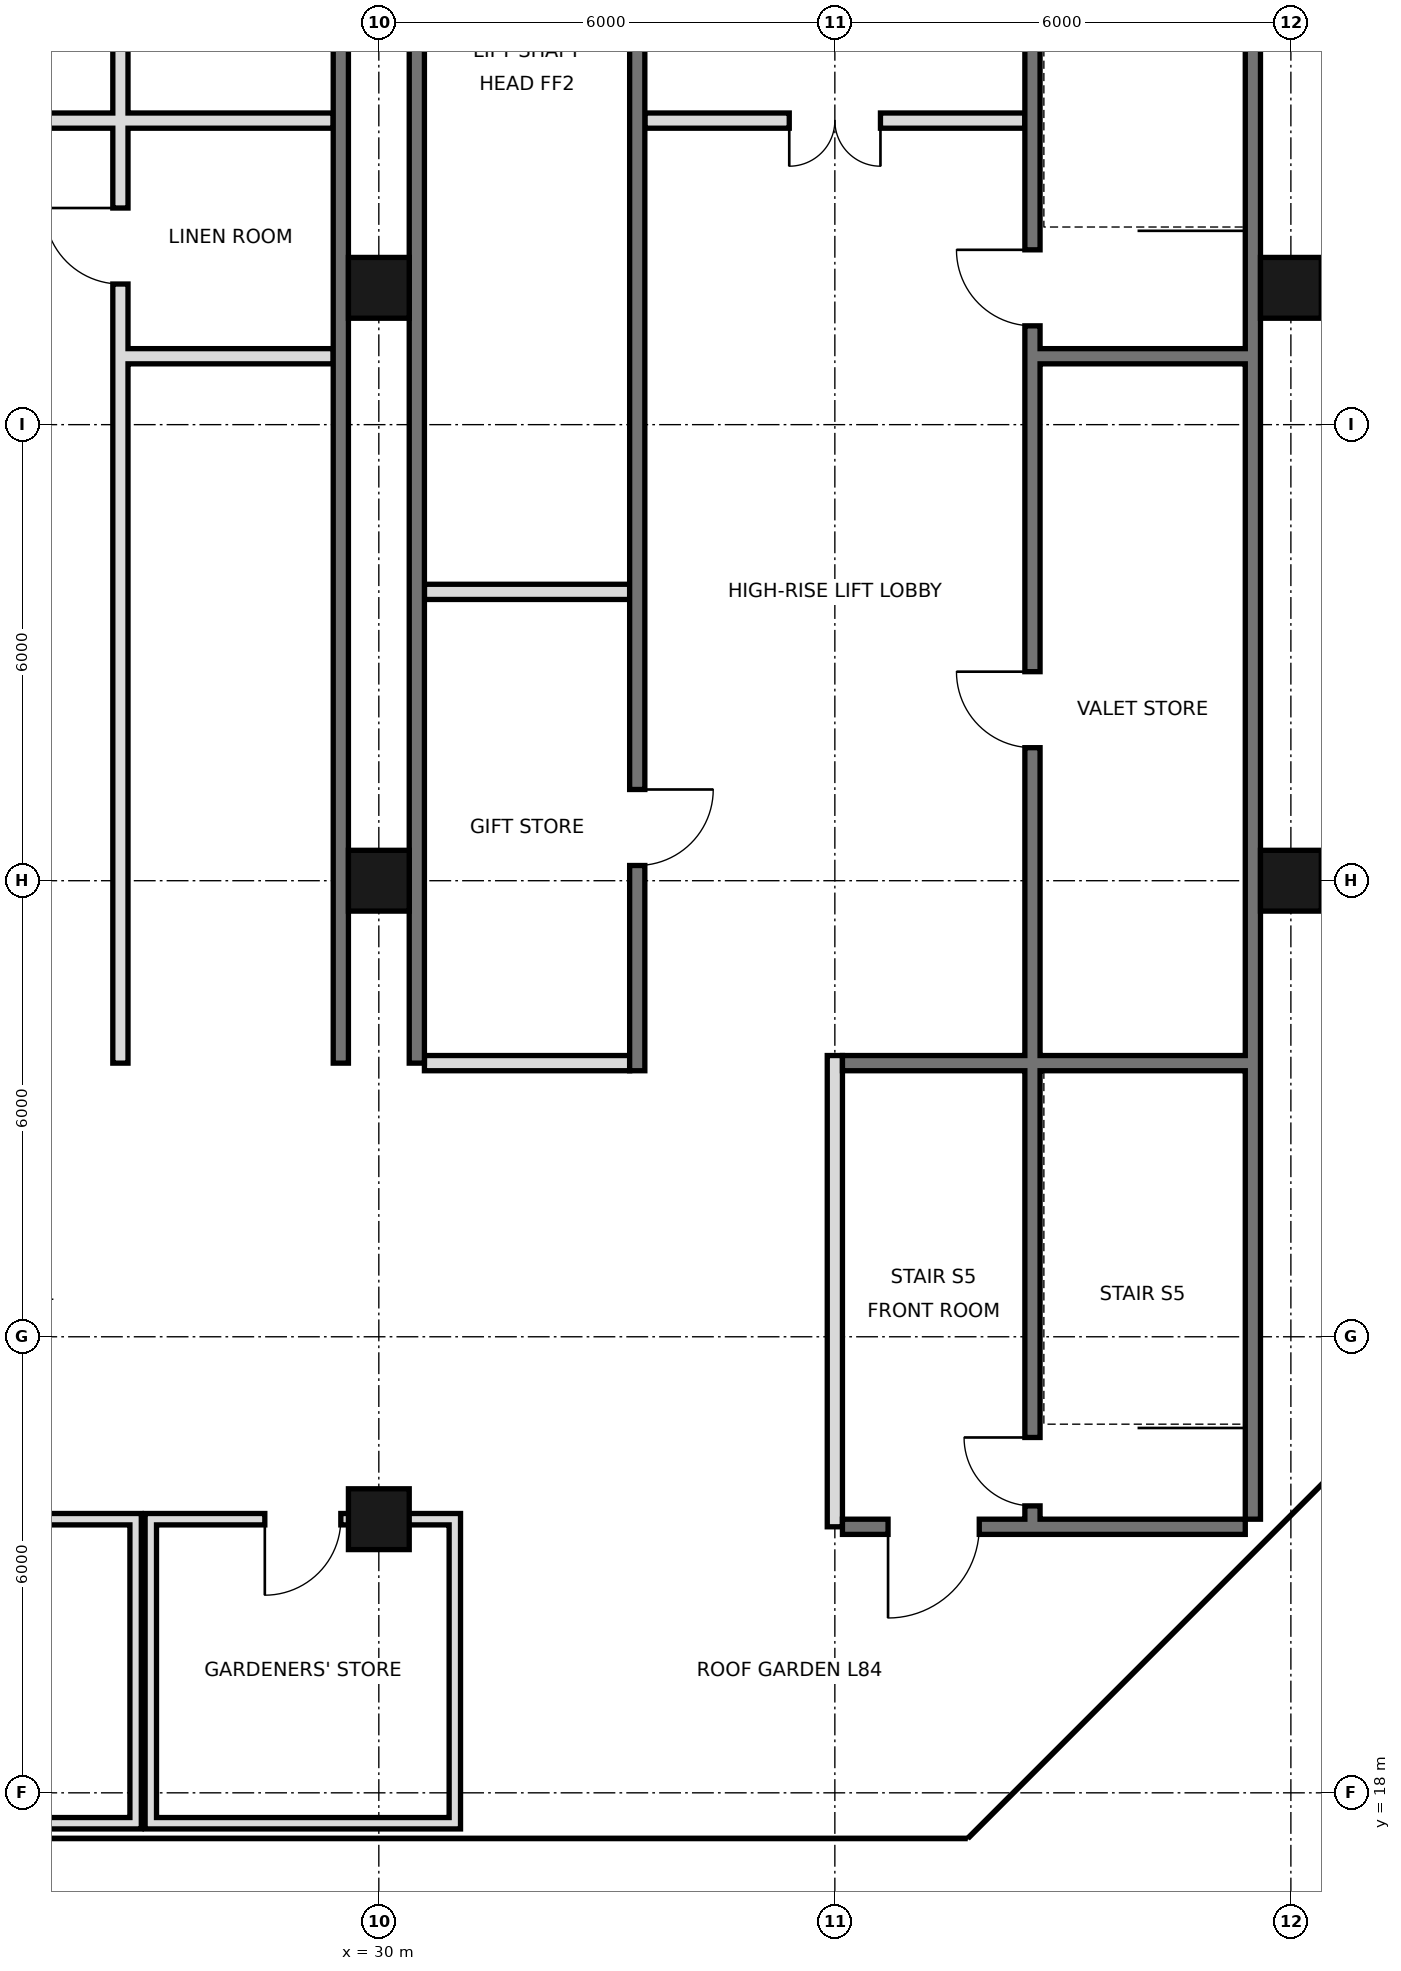
"""IFC4 building model, lengths in metres.
Left out: names, types, materials, properties, quantities, classifications, styles, units other than length and angle.
Written with IfcOpenShell. Run it as: python <this file> out.ifc"""

import sys

from ifc_helpers import new_model, si_unit, direction, frame, frame_2d, origin, origin_2d, place, context, subcontext, project, spatial, rectangle, hollow_rectangle, extrude, element, fill, save


model = new_model("IFC4")
c1 = context("Model", 3, precision=1e-05, world=origin(), true_north=direction((0.0, 1.0)))
c2 = subcontext(c1, "Body", "Model", "MODEL_VIEW")
j1 = project(units=[si_unit("LENGTHUNIT", "METRE"), si_unit("PLANEANGLEUNIT", "RADIAN")], contexts=[c1])
p1 = place(None, origin())
s1 = spatial("IfcSite", under=j1, at=p1, CompositionType="ELEMENT")
p2 = place(p1, origin())
s2 = spatial("IfcBuilding", under=s1, at=p2, CompositionType="ELEMENT")
p3 = place(p2, frame((0.0, 0.0, 353.8)))
s3 = spatial("IfcBuildingStorey", under=s2, at=p3, CompositionType="ELEMENT", Elevation=353.8)
for number, where, z_axis, x_axis in (
    (1, (30.0, 21.6, 0.0), (0.0, 0.0, 1.0), (1.0, 0.0, 0.0)),
    (2, (30.0, 30.0, 0.0), (0.0, 0.0, 1.0), (1.0, 0.0, 0.0)),
    (3, (30.0, 37.8, 0.0), (0.0, 0.0, 1.0), (1.0, 0.0, 0.0)),
    (4, (42.0, 30.0, 0.0), (0.0, 0.0, 1.0), (1.0, 0.0, 0.0)),
    (5, (42.0, 37.8, 0.0), (0.0, 0.0, 1.0), (1.0, 0.0, 0.0)),
):
    element("IfcColumn", number, at=place(p3, frame(where, z_axis=z_axis, x_axis=x_axis)), inside=s3, PredefinedType="COLUMN", context=c2, shape_type="SweptSolid", body=[
        extrude(hollow_rectangle(XDim=0.8, YDim=0.8, WallThickness=0.025, at=origin_2d()), origin(), (0.0, 0.0, 1.0), 3.75),
    ])
for number, where, z_axis, x_axis in (
    (6, (26.8, 17.525, 0.0), (0.0, 0.0, 1.0), (0.0, 1.0, 0.0)),
    (7, (27.0, 17.525, 0.0), (0.0, 0.0, 1.0), (0.0, 1.0, 0.0)),
    (8, (31.0, 17.525, 0.0), (0.0, 0.0, 1.0), (0.0, 1.0, 0.0)),
):
    element("IfcWall", number, at=place(p3, frame(where, z_axis=z_axis, x_axis=x_axis)), inside=s3, PredefinedType="PARTITIONING", context=c2, shape_type="SweptSolid", body=[
        extrude(rectangle(XDim=4.15, YDim=0.15, at=frame_2d((2.075, 0.0))), origin(), (0.0, 0.0, 1.0), 3.75),
    ])
p4 = place(p3, frame((17.875, 17.6, 0.0), z_axis=(0.0, 0.0, 1.0), x_axis=(1.0, 0.0, 0.0)))
e9 = element("IfcWall", 9, at=p4, inside=s3, PredefinedType="PARTITIONING", context=c2, shape_type="SweptSolid", body=[
    extrude(rectangle(XDim=8.85, YDim=0.15, at=frame_2d((4.425, 0.0))), origin(), (0.0, 0.0, 1.0), 3.75),
])
p5 = place(p3, frame((27.075, 17.6, 0.0), z_axis=(0.0, 0.0, 1.0), x_axis=(1.0, 0.0, 0.0)))
e10 = element("IfcWall", 10, at=p5, inside=s3, PredefinedType="PARTITIONING", context=c2, shape_type="SweptSolid", body=[
    extrude(rectangle(XDim=3.85, YDim=0.15, at=frame_2d((1.925, 0.0))), origin(), (0.0, 0.0, 1.0), 3.75),
])
p6 = place(p3, frame((17.875, 21.6, 0.0), z_axis=(0.0, 0.0, 1.0), x_axis=(1.0, 0.0, 0.0)))
e11 = element("IfcWall", 11, at=p6, inside=s3, PredefinedType="PARTITIONING", context=c2, shape_type="SweptSolid", body=[
    extrude(rectangle(XDim=8.85, YDim=0.15, at=frame_2d((4.425, 0.0))), origin(), (0.0, 0.0, 1.0), 3.75),
])
p7 = place(p6, frame((3.925, 0.0, 0.0)))
e12 = element("IfcOpeningElement", 12, at=p7, cuts=e11, PredefinedType="OPENING", context=c2, shape_type="SweptSolid", body=[
    extrude(rectangle(XDim=1.0, YDim=2.4, at=frame_2d((0.5, 1.2))), frame((0.0, 0.085, 0.0), z_axis=(0.0, -1.0, 0.0), x_axis=(1.0, 0.0, 0.0)), (0.0, 0.0, 1.0), 0.17),
])
p8 = place(p3, frame((27.075, 21.6, 0.0), z_axis=(0.0, 0.0, 1.0), x_axis=(1.0, 0.0, 0.0)))
e13 = element("IfcWall", 13, at=p8, inside=s3, PredefinedType="PARTITIONING", context=c2, shape_type="SweptSolid", body=[
    extrude(rectangle(XDim=3.85, YDim=0.15, at=frame_2d((1.925, 0.0))), origin(), (0.0, 0.0, 1.0), 3.75),
])
p9 = place(p8, frame((1.425, 0.0, 0.0)))
e14 = element("IfcOpeningElement", 14, at=p9, cuts=e13, PredefinedType="OPENING", context=c2, shape_type="SweptSolid", body=[
    extrude(rectangle(XDim=1.0, YDim=2.4, at=frame_2d((0.5, 1.2))), frame((0.0, 0.085, 0.0), z_axis=(0.0, -1.0, 0.0), x_axis=(1.0, 0.0, 0.0)), (0.0, 0.0, 1.0), 0.17),
])
p10 = place(p3, frame((41.5, 21.6, 0.0), z_axis=(0.0, 0.0, 1.0), x_axis=(0.0, 1.0, 0.0)))
e15 = element("IfcWall", 15, at=p10, inside=s3, PredefinedType="SOLIDWALL", context=c2, shape_type="SweptSolid", body=[
    extrude(rectangle(XDim=23.5, YDim=0.2, at=frame_2d((11.75, 0.0))), origin(), (0.0, 0.0, 1.0), 3.75),
])
for number, where, z_axis, x_axis in (
    (16, (29.5, 27.6, 0.0), (0.0, 0.0, 1.0), (0.0, 1.0, 0.0)),
    (17, (30.5, 27.6, 0.0), (0.0, 0.0, 1.0), (0.0, 1.0, 0.0)),
):
    element("IfcWall", number, at=place(p3, frame(where, z_axis=z_axis, x_axis=x_axis)), inside=s3, PredefinedType="SOLIDWALL", context=c2, shape_type="SweptSolid", body=[
        extrude(rectangle(XDim=17.5, YDim=0.2, at=frame_2d((8.75, 0.0))), origin(), (0.0, 0.0, 1.0), 3.75),
    ])
p11 = place(p3, frame((26.6, 27.6, 0.0), z_axis=(0.0, 0.0, 1.0), x_axis=(0.0, 1.0, 0.0)))
e18 = element("IfcWall", 18, at=p11, inside=s3, PredefinedType="PARTITIONING", context=c2, shape_type="SweptSolid", body=[
    extrude(rectangle(XDim=17.4, YDim=0.2, at=frame_2d((8.7, 0.0))), origin(), (0.0, 0.0, 1.0), 3.75),
])
p12 = place(p11, frame((10.25, 0.0, 0.0)))
e19 = element("IfcOpeningElement", 19, at=p12, cuts=e18, PredefinedType="OPENING", context=c2, shape_type="SweptSolid", body=[
    extrude(rectangle(XDim=1.0, YDim=2.1, at=frame_2d((0.5, 1.05))), frame((0.0, 0.11, 0.0), z_axis=(0.0, -1.0, 0.0), x_axis=(1.0, 0.0, 0.0)), (0.0, 0.0, 1.0), 0.22),
])
p13 = place(p11, frame((14.475, 0.0, 0.0)))
e20 = element("IfcOpeningElement", 20, at=p13, cuts=e18, PredefinedType="OPENING", context=c2, shape_type="SweptSolid", body=[
    extrude(rectangle(XDim=1.0, YDim=2.1, at=frame_2d((0.5, 1.05))), frame((0.0, 0.11, 0.0), z_axis=(0.0, -1.0, 0.0), x_axis=(1.0, 0.0, 0.0)), (0.0, 0.0, 1.0), 0.22),
])
p14 = place(p3, frame((33.4, 27.5, 0.0), z_axis=(0.0, 0.0, 1.0), x_axis=(0.0, 1.0, 0.0)))
e21 = element("IfcWall", 21, at=p14, inside=s3, PredefinedType="SOLIDWALL", context=c2, shape_type="SweptSolid", body=[
    extrude(rectangle(XDim=17.5, YDim=0.2, at=frame_2d((8.75, 0.0))), origin(), (0.0, 0.0, 1.0), 3.75),
])
p15 = place(p14, frame((15.4, 0.0, 0.0)))
e22 = element("IfcOpeningElement", 22, at=p15, cuts=e21, PredefinedType="OPENING", context=c2, shape_type="SweptSolid", body=[
    extrude(rectangle(XDim=1.1, YDim=2.1, at=frame_2d((0.55, 1.05))), frame((0.0, 0.11, 0.0), z_axis=(0.0, -1.0, 0.0), x_axis=(1.0, 0.0, 0.0)), (0.0, 0.0, 1.0), 0.22),
])
p16 = place(p14, frame((2.7, 0.0, 0.0)))
e23 = element("IfcOpeningElement", 23, at=p16, cuts=e21, PredefinedType="OPENING", context=c2, shape_type="SweptSolid", body=[
    extrude(rectangle(XDim=1.0, YDim=2.1, at=frame_2d((0.5, 1.05))), frame((0.0, 0.11, 0.0), z_axis=(0.0, -1.0, 0.0), x_axis=(1.0, 0.0, 0.0)), (0.0, 0.0, 1.0), 0.22),
])
p17 = place(p3, frame((36.0, 21.5, 0.0), z_axis=(0.0, 0.0, 1.0), x_axis=(0.0, 1.0, 0.0)))
e24 = element("IfcWall", 24, at=p17, inside=s3, PredefinedType="PARTITIONING", context=c2, shape_type="SweptSolid", body=[
    extrude(rectangle(XDim=6.2, YDim=0.2, at=frame_2d((3.1, 0.0))), origin(), (0.0, 0.0, 1.0), 3.75),
])
p18 = place(p3, frame((38.6, 21.5, 0.0), z_axis=(0.0, 0.0, 1.0), x_axis=(0.0, 1.0, 0.0)))
e25 = element("IfcWall", 25, at=p18, inside=s3, PredefinedType="SOLIDWALL", context=c2, shape_type="SweptSolid", body=[
    extrude(rectangle(XDim=23.5, YDim=0.2, at=frame_2d((11.75, 0.0))), origin(), (0.0, 0.0, 1.0), 3.75),
])
p19 = place(p18, frame((10.25, 0.0, 0.0)))
e26 = element("IfcOpeningElement", 26, at=p19, cuts=e25, PredefinedType="OPENING", context=c2, shape_type="SweptSolid", body=[
    extrude(rectangle(XDim=1.0, YDim=2.1, at=frame_2d((0.5, 1.05))), frame((0.0, 0.11, 0.0), z_axis=(0.0, -1.0, 0.0), x_axis=(1.0, 0.0, 0.0)), (0.0, 0.0, 1.0), 0.22),
])
p20 = place(p18, frame((15.8, 0.0, 0.0)))
e27 = element("IfcOpeningElement", 27, at=p20, cuts=e25, PredefinedType="OPENING", context=c2, shape_type="SweptSolid", body=[
    extrude(rectangle(XDim=1.0, YDim=2.1, at=frame_2d((0.5, 1.05))), frame((0.0, 0.11, 0.0), z_axis=(0.0, -1.0, 0.0), x_axis=(1.0, 0.0, 0.0)), (0.0, 0.0, 1.0), 0.22),
])
p21 = place(p18, frame((0.275, 0.0, 0.0)))
e28 = element("IfcOpeningElement", 28, at=p21, cuts=e25, PredefinedType="OPENING", context=c2, shape_type="SweptSolid", body=[
    extrude(rectangle(XDim=0.9, YDim=2.1, at=frame_2d((0.45, 1.05))), frame((0.0, 0.11, 0.0), z_axis=(0.0, -1.0, 0.0), x_axis=(1.0, 0.0, 0.0)), (0.0, 0.0, 1.0), 0.22),
])
p22 = place(p3, frame((36.1, 21.5, 0.0), z_axis=(0.0, 0.0, 1.0), x_axis=(1.0, 0.0, 0.0)))
e29 = element("IfcWall", 29, at=p22, inside=s3, PredefinedType="SOLIDWALL", context=c2, shape_type="SweptSolid", body=[
    extrude(rectangle(XDim=5.3, YDim=0.2, at=frame_2d((2.65, 0.0))), origin(), (0.0, 0.0, 1.0), 3.75),
])
p23 = place(p22, frame((0.6, 0.0, 0.0)))
e30 = element("IfcOpeningElement", 30, at=p23, cuts=e29, PredefinedType="OPENING", context=c2, shape_type="SweptSolid", body=[
    extrude(rectangle(XDim=1.2, YDim=2.1, at=frame_2d((0.6, 1.05))), frame((0.0, 0.11, 0.0), z_axis=(0.0, -1.0, 0.0), x_axis=(1.0, 0.0, 0.0)), (0.0, 0.0, 1.0), 0.22),
])
p24 = place(p3, frame((30.6, 27.6, 0.0), z_axis=(0.0, 0.0, 1.0), x_axis=(1.0, 0.0, 0.0)))
e31 = element("IfcWall", 31, at=p24, inside=s3, PredefinedType="PARTITIONING", context=c2, shape_type="SweptSolid", body=[
    extrude(rectangle(XDim=2.7, YDim=0.2, at=frame_2d((1.35, 0.0))), origin(), (0.0, 0.0, 1.0), 3.75),
])
p25 = place(p3, frame((36.1, 27.6, 0.0), z_axis=(0.0, 0.0, 1.0), x_axis=(1.0, 0.0, 0.0)))
e32 = element("IfcWall", 32, at=p25, inside=s3, PredefinedType="SOLIDWALL", context=c2, shape_type="SweptSolid", body=[
    extrude(rectangle(XDim=5.3, YDim=0.2, at=frame_2d((2.65, 0.0))), origin(), (0.0, 0.0, 1.0), 3.75),
])
for number, where, z_axis, x_axis in (
    (33, (30.6, 33.8, 0.0), (0.0, 0.0, 1.0), (1.0, 0.0, 0.0)),
    (34, (26.7, 36.9, 0.0), (0.0, 0.0, 1.0), (1.0, 0.0, 0.0)),
):
    element("IfcWall", number, at=place(p3, frame(where, z_axis=z_axis, x_axis=x_axis)), inside=s3, PredefinedType="PARTITIONING", context=c2, shape_type="SweptSolid", body=[
        extrude(rectangle(XDim=2.7, YDim=0.2, at=frame_2d((1.35, 0.0))), origin(), (0.0, 0.0, 1.0), 3.75),
    ])
p26 = place(p3, frame((38.7, 36.9, 0.0), z_axis=(0.0, 0.0, 1.0), x_axis=(1.0, 0.0, 0.0)))
e35 = element("IfcWall", 35, at=p26, inside=s3, PredefinedType="SOLIDWALL", context=c2, shape_type="SweptSolid", body=[
    extrude(rectangle(XDim=2.7, YDim=0.2, at=frame_2d((1.35, 0.0))), origin(), (0.0, 0.0, 1.0), 3.75),
])
p27 = place(p3, frame((21.5, 40.0, 0.0), z_axis=(0.0, 0.0, 1.0), x_axis=(1.0, 0.0, 0.0)))
e36 = element("IfcWall", 36, at=p27, inside=s3, PredefinedType="PARTITIONING", context=c2, shape_type="SweptSolid", body=[
    extrude(rectangle(XDim=7.9, YDim=0.2, at=frame_2d((3.95, 0.0))), origin(), (0.0, 0.0, 1.0), 3.75),
])
p28 = place(p27, frame((1.9, 0.0, 0.0)))
e37 = element("IfcOpeningElement", 37, at=p28, cuts=e36, PredefinedType="OPENING", context=c2, shape_type="SweptSolid", body=[
    extrude(rectangle(XDim=1.2, YDim=2.1, at=frame_2d((0.6, 1.05))), frame((0.0, 0.11, 0.0), z_axis=(0.0, -1.0, 0.0), x_axis=(1.0, 0.0, 0.0)), (0.0, 0.0, 1.0), 0.22),
])
p29 = place(p3, frame((33.5, 40.0, 0.0), z_axis=(0.0, 0.0, 1.0), x_axis=(1.0, 0.0, 0.0)))
e38 = element("IfcWall", 38, at=p29, inside=s3, PredefinedType="PARTITIONING", context=c2, shape_type="SweptSolid", body=[
    extrude(rectangle(XDim=5.0, YDim=0.2, at=frame_2d((2.5, 0.0))), origin(), (0.0, 0.0, 1.0), 3.75),
])
p30 = place(p29, frame((1.9, 0.0, 0.0)))
e39 = element("IfcOpeningElement", 39, at=p30, cuts=e38, PredefinedType="OPENING", context=c2, shape_type="SweptSolid", body=[
    extrude(rectangle(XDim=1.2, YDim=2.1, at=frame_2d((0.6, 1.05))), frame((0.0, 0.11, 0.0), z_axis=(0.0, -1.0, 0.0), x_axis=(1.0, 0.0, 0.0)), (0.0, 0.0, 1.0), 0.22),
])
p31 = place(p9, frame((1.0, 0.0, 0.0), z_axis=(0.0, 0.0, 1.0), x_axis=(-1.0, 0.0, 0.0)))
e40 = element("IfcDoor", 40, at=p31, inside=s3, OperationType="SINGLE_SWING_RIGHT", PredefinedType="DOOR", context=c2, shape_type="SweptSolid", body=[
    extrude(rectangle(XDim=1.0, YDim=2.4, at=frame_2d((0.5, 1.2))), frame((0.0, 0.025, 0.0), z_axis=(0.0, -1.0, 0.0), x_axis=(1.0, 0.0, 0.0)), (0.0, 0.0, 1.0), 0.05),
])
fill(e14, e40)
p32 = place(p23, frame((1.2, 0.0, 0.0), z_axis=(0.0, 0.0, 1.0), x_axis=(-1.0, 0.0, 0.0)))
e41 = element("IfcDoor", 41, at=p32, inside=s3, OperationType="SINGLE_SWING_RIGHT", PredefinedType="DOOR", context=c2, shape_type="SweptSolid", body=[
    extrude(rectangle(XDim=1.2, YDim=2.1, at=frame_2d((0.6, 1.05))), frame((0.0, 0.025, 0.0), z_axis=(0.0, -1.0, 0.0), x_axis=(1.0, 0.0, 0.0)), (0.0, 0.0, 1.0), 0.05),
])
fill(e30, e41)
p33 = place(p30, frame((1.2, 0.0, 0.0), z_axis=(0.0, 0.0, 1.0), x_axis=(-1.0, 0.0, 0.0)))
e42 = element("IfcDoor", 42, at=p33, inside=s3, OperationType="DOUBLE_DOOR_SINGLE_SWING", PredefinedType="DOOR", context=c2, shape_type="SweptSolid", body=[
    extrude(rectangle(XDim=1.2, YDim=2.1, at=frame_2d((0.6, 1.05))), frame((0.0, 0.025, 0.0), z_axis=(0.0, -1.0, 0.0), x_axis=(1.0, 0.0, 0.0)), (0.0, 0.0, 1.0), 0.05),
])
fill(e39, e42)
p34 = place(p19, frame((1.0, 0.0, 0.0), z_axis=(0.0, 0.0, 1.0), x_axis=(-1.0, 0.0, 0.0)))
e43 = element("IfcDoor", 43, at=p34, inside=s3, OperationType="SINGLE_SWING_LEFT", PredefinedType="DOOR", context=c2, shape_type="SweptSolid", body=[
    extrude(rectangle(XDim=1.0, YDim=2.1, at=frame_2d((0.5, 1.05))), frame((0.0, 0.025, 0.0), z_axis=(0.0, -1.0, 0.0), x_axis=(1.0, 0.0, 0.0)), (0.0, 0.0, 1.0), 0.05),
])
fill(e26, e43)
p35 = place(p16, origin())
e44 = element("IfcDoor", 44, at=p35, inside=s3, OperationType="SINGLE_SWING_RIGHT", PredefinedType="DOOR", context=c2, shape_type="SweptSolid", body=[
    extrude(rectangle(XDim=1.0, YDim=2.1, at=frame_2d((0.5, 1.05))), frame((0.0, 0.025, 0.0), z_axis=(0.0, -1.0, 0.0), x_axis=(1.0, 0.0, 0.0)), (0.0, 0.0, 1.0), 0.05),
])
fill(e23, e44)
p36 = place(p20, frame((1.0, 0.0, 0.0), z_axis=(0.0, 0.0, 1.0), x_axis=(-1.0, 0.0, 0.0)))
e45 = element("IfcDoor", 45, at=p36, inside=s3, OperationType="SINGLE_SWING_LEFT", PredefinedType="DOOR", context=c2, shape_type="SweptSolid", body=[
    extrude(rectangle(XDim=1.0, YDim=2.1, at=frame_2d((0.5, 1.05))), frame((0.0, 0.025, 0.0), z_axis=(0.0, -1.0, 0.0), x_axis=(1.0, 0.0, 0.0)), (0.0, 0.0, 1.0), 0.05),
])
fill(e27, e45)
p37 = place(p21, frame((0.9, 0.0, 0.0), z_axis=(0.0, 0.0, 1.0), x_axis=(-1.0, 0.0, 0.0)))
e46 = element("IfcDoor", 46, at=p37, inside=s3, OperationType="SINGLE_SWING_LEFT", PredefinedType="DOOR", context=c2, shape_type="SweptSolid", body=[
    extrude(rectangle(XDim=0.9, YDim=2.1, at=frame_2d((0.45, 1.05))), frame((0.0, 0.025, 0.0), z_axis=(0.0, -1.0, 0.0), x_axis=(1.0, 0.0, 0.0)), (0.0, 0.0, 1.0), 0.05),
])
fill(e28, e46)
p38 = place(p12, frame((1.0, 0.0, 0.0), z_axis=(0.0, 0.0, 1.0), x_axis=(-1.0, 0.0, 0.0)))
e47 = element("IfcDoor", 47, at=p38, inside=s3, OperationType="SINGLE_SWING_LEFT", PredefinedType="DOOR", context=c2, shape_type="SweptSolid", body=[
    extrude(rectangle(XDim=1.0, YDim=2.1, at=frame_2d((0.5, 1.05))), frame((0.0, 0.025, 0.0), z_axis=(0.0, -1.0, 0.0), x_axis=(1.0, 0.0, 0.0)), (0.0, 0.0, 1.0), 0.05),
])
fill(e19, e47)
save(model, sys.argv[1])
